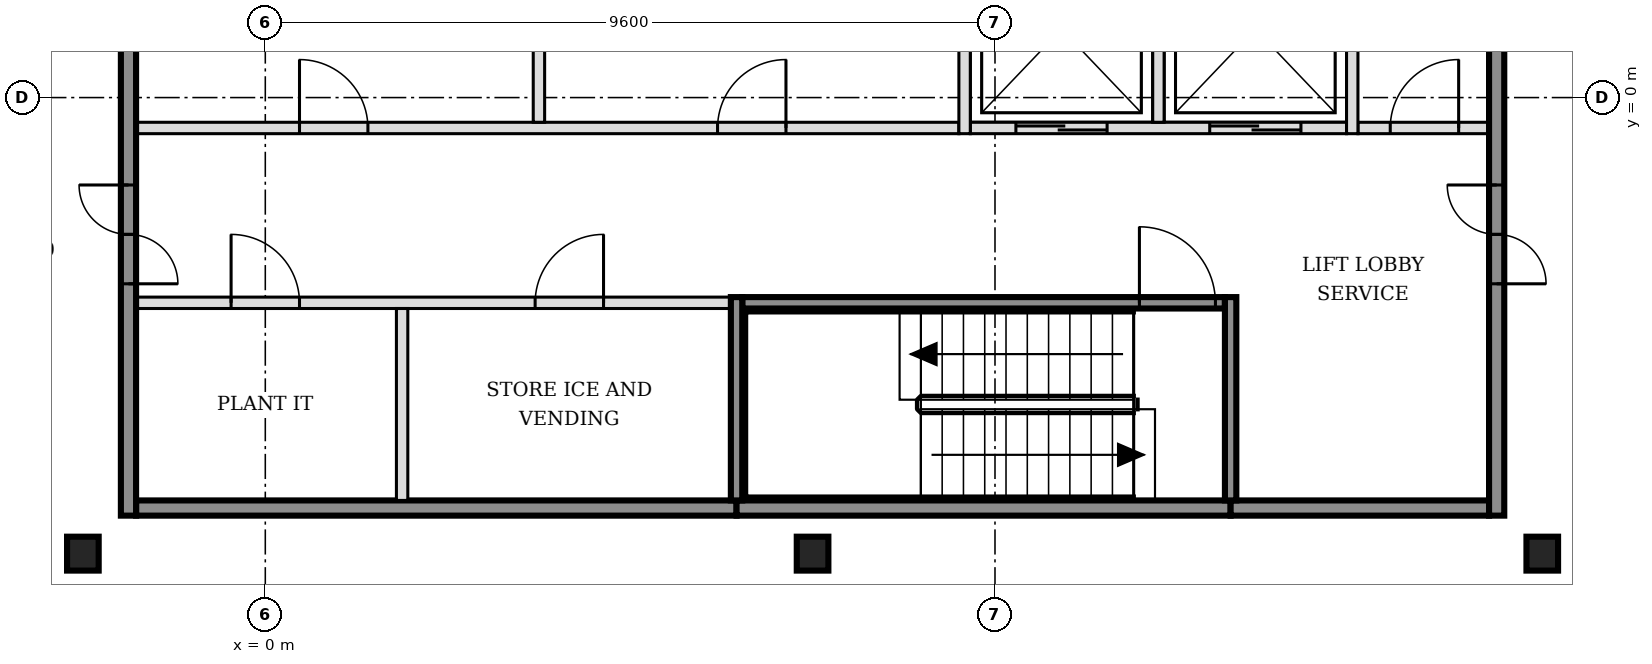
"""IFC4 building model, lengths in metres.
Left out: names, types, materials, properties, quantities, classifications, styles, units other than length and angle.
Written with IfcOpenShell. Run it as: python <this file> out.ifc"""

import sys

from ifc_helpers import new_model, si_unit, direction, frame, frame_2d, origin, origin_2d, place, context, subcontext, project, spatial, rectangle, i_section, extrude, element, fill, save


model = new_model("IFC4")
c1 = context("Model", 3, precision=1e-05, world=origin(), true_north=direction((0.0, 1.0)))
c2 = subcontext(c1, "Body", "Model", "MODEL_VIEW")
j1 = project(units=[si_unit("LENGTHUNIT", "METRE"), si_unit("PLANEANGLEUNIT", "RADIAN")], contexts=[c1])
p1 = place(None, origin())
s1 = spatial("IfcSite", under=j1, at=p1, CompositionType="ELEMENT")
p2 = place(p1, origin())
s2 = spatial("IfcBuilding", under=s1, at=p2, CompositionType="ELEMENT")
p3 = place(p2, frame((0.0, 0.0, 165.0)))
s3 = spatial("IfcBuildingStorey", under=s2, at=p3, CompositionType="ELEMENT", Elevation=165.0)
for number, where, z_axis, x_axis in (
    (1, (-2.4, -6.0, -0.15), (0.0, 0.0, 1.0), (1.0, 0.0, 0.0)),
    (2, (7.2, -6.0, -0.15), (0.0, 0.0, 1.0), (1.0, 0.0, 0.0)),
    (3, (16.8, -6.0, -0.15), (0.0, 0.0, 1.0), (1.0, 0.0, 0.0)),
):
    element("IfcColumn", number, at=place(p3, frame(where, z_axis=z_axis, x_axis=x_axis)), inside=s3, PredefinedType="COLUMN", context=c2, shape_type="SweptSolid", body=[
        extrude(i_section(OverallWidth=0.416, OverallDepth=0.446, WebThickness=0.039, FlangeThickness=0.063, FilletRadius=0.015, at=origin_2d()), origin(), (0.0, 0.0, 1.0), 3.6),
    ])
p4 = place(p3, frame((-1.7, -5.4, 0.0), z_axis=(0.0, 0.0, 1.0), x_axis=(1.0, 0.0, 0.0)))
e4 = element("IfcWall", 4, at=p4, inside=s3, PredefinedType="SOLIDWALL", context=c2, shape_type="SweptSolid", body=[
    extrude(rectangle(XDim=7.9, YDim=0.2, at=frame_2d((3.95, 0.0))), origin(), (0.0, 0.0, 1.0), 3.45),
])
p5 = place(p3, frame((6.2, -5.4, 0.0), z_axis=(0.0, 0.0, 1.0), x_axis=(1.0, 0.0, 0.0)))
e5 = element("IfcWall", 5, at=p5, inside=s3, PredefinedType="SOLIDWALL", context=c2, shape_type="SweptSolid", body=[
    extrude(rectangle(XDim=6.5, YDim=0.2, at=frame_2d((3.25, 0.0))), origin(), (0.0, 0.0, 1.0), 3.45),
])
p6 = place(p3, frame((12.7, -5.4, 0.0), z_axis=(0.0, 0.0, 1.0), x_axis=(1.0, 0.0, 0.0)))
e6 = element("IfcWall", 6, at=p6, inside=s3, PredefinedType="SOLIDWALL", context=c2, shape_type="SweptSolid", body=[
    extrude(rectangle(XDim=3.4, YDim=0.2, at=frame_2d((1.7, 0.0))), origin(), (0.0, 0.0, 1.0), 3.45),
])
p7 = place(p3, frame((-1.7, -2.7, 0.0), z_axis=(0.0, 0.0, 1.0), x_axis=(1.0, 0.0, 0.0)))
e7 = element("IfcWall", 7, at=p7, inside=s3, PredefinedType="PARTITIONING", context=c2, shape_type="SweptSolid", body=[
    extrude(rectangle(XDim=7.825, YDim=0.15, at=frame_2d((3.913, 0.0))), origin(), (0.0, 0.0, 1.0), 3.45),
])
p8 = place(p7, frame((1.25, 0.0, 0.0)))
e8 = element("IfcOpeningElement", 8, at=p8, cuts=e7, PredefinedType="OPENING", context=c2, shape_type="SweptSolid", body=[
    extrude(rectangle(XDim=0.9, YDim=2.1, at=frame_2d((0.45, 1.05))), frame((0.0, 0.085, 0.0), z_axis=(0.0, -1.0, 0.0), x_axis=(1.0, 0.0, 0.0)), (0.0, 0.0, 1.0), 0.17),
])
p9 = place(p7, frame((5.25, 0.0, 0.0)))
e9 = element("IfcOpeningElement", 9, at=p9, cuts=e7, PredefinedType="OPENING", context=c2, shape_type="SweptSolid", body=[
    extrude(rectangle(XDim=0.9, YDim=2.1, at=frame_2d((0.45, 1.05))), frame((0.0, 0.085, 0.0), z_axis=(0.0, -1.0, 0.0), x_axis=(1.0, 0.0, 0.0)), (0.0, 0.0, 1.0), 0.17),
])
p10 = place(p3, frame((6.275, -2.7, 0.0), z_axis=(0.0, 0.0, 1.0), x_axis=(1.0, 0.0, 0.0)))
e10 = element("IfcWall", 10, at=p10, inside=s3, PredefinedType="SOLIDWALL", context=c2, shape_type="SweptSolid", body=[
    extrude(rectangle(XDim=6.35, YDim=0.15, at=frame_2d((3.175, 0.0))), origin(), (0.0, 0.0, 1.0), 3.45),
])
p11 = place(p10, frame((5.225, 0.0, 0.0)))
e11 = element("IfcOpeningElement", 11, at=p11, cuts=e10, PredefinedType="OPENING", context=c2, shape_type="SweptSolid", body=[
    extrude(rectangle(XDim=1.0, YDim=2.1, at=frame_2d((0.5, 1.05))), frame((0.0, 0.085, 0.0), z_axis=(0.0, -1.0, 0.0), x_axis=(1.0, 0.0, 0.0)), (0.0, 0.0, 1.0), 0.17),
])
p12 = place(p3, frame((-1.7, -0.4, 0.0), z_axis=(0.0, 0.0, 1.0), x_axis=(1.0, 0.0, 0.0)))
e12 = element("IfcWall", 12, at=p12, inside=s3, PredefinedType="PARTITIONING", context=c2, shape_type="SweptSolid", body=[
    extrude(rectangle(XDim=10.825, YDim=0.15, at=frame_2d((5.413, 0.0))), origin(), (0.0, 0.0, 1.0), 3.45),
])
p13 = place(p12, frame((2.15, 0.0, 0.0)))
e13 = element("IfcOpeningElement", 13, at=p13, cuts=e12, PredefinedType="OPENING", context=c2, shape_type="SweptSolid", body=[
    extrude(rectangle(XDim=0.9, YDim=2.1, at=frame_2d((0.45, 1.05))), frame((0.0, 0.085, 0.0), z_axis=(0.0, -1.0, 0.0), x_axis=(1.0, 0.0, 0.0)), (0.0, 0.0, 1.0), 0.17),
])
p14 = place(p12, frame((7.65, 0.0, 0.0)))
e14 = element("IfcOpeningElement", 14, at=p14, cuts=e12, PredefinedType="OPENING", context=c2, shape_type="SweptSolid", body=[
    extrude(rectangle(XDim=0.9, YDim=2.1, at=frame_2d((0.45, 1.05))), frame((0.0, 0.085, 0.0), z_axis=(0.0, -1.0, 0.0), x_axis=(1.0, 0.0, 0.0)), (0.0, 0.0, 1.0), 0.17),
])
p15 = place(p3, frame((9.275, -0.4, 0.0), z_axis=(0.0, 0.0, 1.0), x_axis=(1.0, 0.0, 0.0)))
e15 = element("IfcWall", 15, at=p15, inside=s3, PredefinedType="SOLIDWALL", context=c2, shape_type="SweptSolid", body=[
    extrude(rectangle(XDim=4.95, YDim=0.15, at=frame_2d((2.475, 0.0))), origin(), (0.0, 0.0, 1.0), 3.45),
])
p16 = place(p15, frame((0.6, 0.0, 0.0)))
e16 = element("IfcOpeningElement", 16, at=p16, cuts=e15, PredefinedType="OPENING", context=c2, shape_type="SweptSolid", body=[
    extrude(rectangle(XDim=1.2, YDim=2.1, at=frame_2d((0.6, 1.05))), frame((0.0, 0.085, 0.0), z_axis=(0.0, -1.0, 0.0), x_axis=(1.0, 0.0, 0.0)), (0.0, 0.0, 1.0), 0.17),
])
p17 = place(p15, frame((3.15, 0.0, 0.0)))
e17 = element("IfcOpeningElement", 17, at=p17, cuts=e15, PredefinedType="OPENING", context=c2, shape_type="SweptSolid", body=[
    extrude(rectangle(XDim=1.2, YDim=2.1, at=frame_2d((0.6, 1.05))), frame((0.0, 0.085, 0.0), z_axis=(0.0, -1.0, 0.0), x_axis=(1.0, 0.0, 0.0)), (0.0, 0.0, 1.0), 0.17),
])
p18 = place(p3, frame((14.375, -0.4, 0.0), z_axis=(0.0, 0.0, 1.0), x_axis=(1.0, 0.0, 0.0)))
e18 = element("IfcWall", 18, at=p18, inside=s3, PredefinedType="PARTITIONING", context=c2, shape_type="SweptSolid", body=[
    extrude(rectangle(XDim=1.725, YDim=0.15, at=frame_2d((0.863, 0.0))), origin(), (0.0, 0.0, 1.0), 3.45),
])
p19 = place(p18, frame((0.425, 0.0, 0.0)))
e19 = element("IfcOpeningElement", 19, at=p19, cuts=e18, PredefinedType="OPENING", context=c2, shape_type="SweptSolid", body=[
    extrude(rectangle(XDim=0.9, YDim=2.1, at=frame_2d((0.45, 1.05))), frame((0.0, 0.085, 0.0), z_axis=(0.0, -1.0, 0.0), x_axis=(1.0, 0.0, 0.0)), (0.0, 0.0, 1.0), 0.17),
])
p20 = place(p3, frame((-1.8, -5.5, 0.0), z_axis=(0.0, 0.0, 1.0), x_axis=(0.0, 1.0, 0.0)))
e20 = element("IfcWall", 20, at=p20, inside=s3, PredefinedType="SOLIDWALL", context=c2, shape_type="SweptSolid", body=[
    extrude(rectangle(XDim=15.8, YDim=0.2, at=frame_2d((7.9, 0.0))), origin(), (0.0, 0.0, 1.0), 3.45),
])
p21 = place(p20, frame((3.05, 0.0, 0.0)))
e21 = element("IfcOpeningElement", 21, at=p21, cuts=e20, PredefinedType="OPENING", context=c2, shape_type="SweptSolid", body=[
    extrude(rectangle(XDim=1.3, YDim=2.1, at=frame_2d((0.65, 1.05))), frame((0.0, 0.11, 0.0), z_axis=(0.0, -1.0, 0.0), x_axis=(1.0, 0.0, 0.0)), (0.0, 0.0, 1.0), 0.22),
])
p22 = place(p20, frame((11.45, 0.0, 0.0)))
e22 = element("IfcOpeningElement", 22, at=p22, cuts=e20, PredefinedType="OPENING", context=c2, shape_type="SweptSolid", body=[
    extrude(rectangle(XDim=1.3, YDim=2.1, at=frame_2d((0.65, 1.05))), frame((0.0, 0.11, 0.0), z_axis=(0.0, -1.0, 0.0), x_axis=(1.0, 0.0, 0.0)), (0.0, 0.0, 1.0), 0.22),
])
p23 = place(p3, frame((1.8, -5.3, 0.0), z_axis=(0.0, 0.0, 1.0), x_axis=(0.0, 1.0, 0.0)))
e23 = element("IfcWall", 23, at=p23, inside=s3, PredefinedType="PARTITIONING", context=c2, shape_type="SweptSolid", body=[
    extrude(rectangle(XDim=2.525, YDim=0.15, at=frame_2d((1.263, 0.0))), origin(), (0.0, 0.0, 1.0), 3.45),
])
p24 = place(p3, frame((3.6, -0.325, 0.0), z_axis=(0.0, 0.0, 1.0), x_axis=(0.0, 1.0, 0.0)))
e24 = element("IfcWall", 24, at=p24, inside=s3, PredefinedType="PARTITIONING", context=c2, shape_type="SweptSolid", body=[
    extrude(rectangle(XDim=2.45, YDim=0.15, at=frame_2d((1.225, 0.0))), origin(), (0.0, 0.0, 1.0), 3.45),
])
p25 = place(p3, frame((6.2, -5.3, 0.0), z_axis=(0.0, 0.0, 1.0), x_axis=(0.0, 1.0, 0.0)))
e25 = element("IfcWall", 25, at=p25, inside=s3, PredefinedType="SOLIDWALL", context=c2, shape_type="SweptSolid", body=[
    extrude(rectangle(XDim=2.675, YDim=0.15, at=frame_2d((1.337, 0.0))), origin(), (0.0, 0.0, 1.0), 3.45),
])
p26 = place(p3, frame((9.2, -0.475, 0.0), z_axis=(0.0, 0.0, 1.0), x_axis=(0.0, 1.0, 0.0)))
e26 = element("IfcWall", 26, at=p26, inside=s3, PredefinedType="SOLIDWALL", context=c2, shape_type="SweptSolid", body=[
    extrude(rectangle(XDim=2.6, YDim=0.15, at=frame_2d((1.3, 0.0))), origin(), (0.0, 0.0, 1.0), 3.45),
])
p27 = place(p3, frame((11.75, -0.325, 0.0), z_axis=(0.0, 0.0, 1.0), x_axis=(0.0, 1.0, 0.0)))
e27 = element("IfcWall", 27, at=p27, inside=s3, PredefinedType="SOLIDWALL", context=c2, shape_type="SweptSolid", body=[
    extrude(rectangle(XDim=2.45, YDim=0.15, at=frame_2d((1.225, 0.0))), origin(), (0.0, 0.0, 1.0), 3.45),
])
p28 = place(p3, frame((12.7, -5.3, 0.0), z_axis=(0.0, 0.0, 1.0), x_axis=(0.0, 1.0, 0.0)))
e28 = element("IfcWall", 28, at=p28, inside=s3, PredefinedType="SOLIDWALL", context=c2, shape_type="SweptSolid", body=[
    extrude(rectangle(XDim=2.675, YDim=0.15, at=frame_2d((1.337, 0.0))), origin(), (0.0, 0.0, 1.0), 3.45),
])
p29 = place(p3, frame((14.3, -0.475, 0.0), z_axis=(0.0, 0.0, 1.0), x_axis=(0.0, 1.0, 0.0)))
e29 = element("IfcWall", 29, at=p29, inside=s3, PredefinedType="SOLIDWALL", context=c2, shape_type="SweptSolid", body=[
    extrude(rectangle(XDim=2.75, YDim=0.15, at=frame_2d((1.375, 0.0))), origin(), (0.0, 0.0, 1.0), 3.45),
])
p30 = place(p3, frame((16.2, -5.5, 0.0), z_axis=(0.0, 0.0, 1.0), x_axis=(0.0, 1.0, 0.0)))
e30 = element("IfcWall", 30, at=p30, inside=s3, PredefinedType="SOLIDWALL", context=c2, shape_type="SweptSolid", body=[
    extrude(rectangle(XDim=15.8, YDim=0.2, at=frame_2d((7.9, 0.0))), origin(), (0.0, 0.0, 1.0), 3.45),
])
p31 = place(p30, frame((3.05, 0.0, 0.0)))
e31 = element("IfcOpeningElement", 31, at=p31, cuts=e30, PredefinedType="OPENING", context=c2, shape_type="SweptSolid", body=[
    extrude(rectangle(XDim=1.3, YDim=2.1, at=frame_2d((0.65, 1.05))), frame((0.0, 0.11, 0.0), z_axis=(0.0, -1.0, 0.0), x_axis=(1.0, 0.0, 0.0)), (0.0, 0.0, 1.0), 0.22),
])
p32 = place(p30, frame((11.45, 0.0, 0.0)))
e32 = element("IfcOpeningElement", 32, at=p32, cuts=e30, PredefinedType="OPENING", context=c2, shape_type="SweptSolid", body=[
    extrude(rectangle(XDim=1.3, YDim=2.1, at=frame_2d((0.65, 1.05))), frame((0.0, 0.11, 0.0), z_axis=(0.0, -1.0, 0.0), x_axis=(1.0, 0.0, 0.0)), (0.0, 0.0, 1.0), 0.22),
])
p33 = place(p16, origin())
e33 = element("IfcDoor", 33, at=p33, inside=s3, OperationType="DOUBLE_DOOR_SLIDING", PredefinedType="DOOR", context=c2, shape_type="SweptSolid", body=[
    extrude(rectangle(XDim=1.2, YDim=2.1, at=frame_2d((0.6, 1.05))), frame((0.0, 0.025, 0.0), z_axis=(0.0, -1.0, 0.0), x_axis=(1.0, 0.0, 0.0)), (0.0, 0.0, 1.0), 0.05),
])
fill(e16, e33)
p34 = place(p17, origin())
e34 = element("IfcDoor", 34, at=p34, inside=s3, OperationType="DOUBLE_DOOR_SLIDING", PredefinedType="DOOR", context=c2, shape_type="SweptSolid", body=[
    extrude(rectangle(XDim=1.2, YDim=2.1, at=frame_2d((0.6, 1.05))), frame((0.0, 0.025, 0.0), z_axis=(0.0, -1.0, 0.0), x_axis=(1.0, 0.0, 0.0)), (0.0, 0.0, 1.0), 0.05),
])
fill(e17, e34)
p35 = place(p11, origin())
e35 = element("IfcDoor", 35, at=p35, inside=s3, OperationType="SINGLE_SWING_LEFT", PredefinedType="DOOR", context=c2, shape_type="SweptSolid", body=[
    extrude(rectangle(XDim=1.0, YDim=2.1, at=frame_2d((0.5, 1.05))), frame((0.0, 0.025, 0.0), z_axis=(0.0, -1.0, 0.0), x_axis=(1.0, 0.0, 0.0)), (0.0, 0.0, 1.0), 0.05),
])
fill(e11, e35)
p36 = place(p21, origin())
e36 = element("IfcDoor", 36, at=p36, inside=s3, OperationType="DOUBLE_DOOR_SINGLE_SWING", PredefinedType="DOOR", context=c2, shape_type="SweptSolid", body=[
    extrude(rectangle(XDim=1.3, YDim=2.1, at=frame_2d((0.65, 1.05))), frame((0.0, 0.025, 0.0), z_axis=(0.0, -1.0, 0.0), x_axis=(1.0, 0.0, 0.0)), (0.0, 0.0, 1.0), 0.05),
])
fill(e21, e36)
p37 = place(p31, origin())
e37 = element("IfcDoor", 37, at=p37, inside=s3, OperationType="DOUBLE_DOOR_SINGLE_SWING", PredefinedType="DOOR", context=c2, shape_type="SweptSolid", body=[
    extrude(rectangle(XDim=1.3, YDim=2.1, at=frame_2d((0.65, 1.05))), frame((0.0, 0.025, 0.0), z_axis=(0.0, -1.0, 0.0), x_axis=(1.0, 0.0, 0.0)), (0.0, 0.0, 1.0), 0.05),
])
fill(e31, e37)
p38 = place(p19, origin())
e38 = element("IfcDoor", 38, at=p38, inside=s3, OperationType="SINGLE_SWING_RIGHT", PredefinedType="DOOR", context=c2, shape_type="SweptSolid", body=[
    extrude(rectangle(XDim=0.9, YDim=2.1, at=frame_2d((0.45, 1.05))), frame((0.0, 0.025, 0.0), z_axis=(0.0, -1.0, 0.0), x_axis=(1.0, 0.0, 0.0)), (0.0, 0.0, 1.0), 0.05),
])
fill(e19, e38)
p39 = place(p8, origin())
e39 = element("IfcDoor", 39, at=p39, inside=s3, OperationType="SINGLE_SWING_LEFT", PredefinedType="DOOR", context=c2, shape_type="SweptSolid", body=[
    extrude(rectangle(XDim=0.9, YDim=2.1, at=frame_2d((0.45, 1.05))), frame((0.0, 0.025, 0.0), z_axis=(0.0, -1.0, 0.0), x_axis=(1.0, 0.0, 0.0)), (0.0, 0.0, 1.0), 0.05),
])
fill(e8, e39)
p40 = place(p9, origin())
e40 = element("IfcDoor", 40, at=p40, inside=s3, OperationType="SINGLE_SWING_RIGHT", PredefinedType="DOOR", context=c2, shape_type="SweptSolid", body=[
    extrude(rectangle(XDim=0.9, YDim=2.1, at=frame_2d((0.45, 1.05))), frame((0.0, 0.025, 0.0), z_axis=(0.0, -1.0, 0.0), x_axis=(1.0, 0.0, 0.0)), (0.0, 0.0, 1.0), 0.05),
])
fill(e9, e40)
p41 = place(p13, origin())
e41 = element("IfcDoor", 41, at=p41, inside=s3, OperationType="SINGLE_SWING_LEFT", PredefinedType="DOOR", context=c2, shape_type="SweptSolid", body=[
    extrude(rectangle(XDim=0.9, YDim=2.1, at=frame_2d((0.45, 1.05))), frame((0.0, 0.025, 0.0), z_axis=(0.0, -1.0, 0.0), x_axis=(1.0, 0.0, 0.0)), (0.0, 0.0, 1.0), 0.05),
])
fill(e13, e41)
p42 = place(p14, origin())
e42 = element("IfcDoor", 42, at=p42, inside=s3, OperationType="SINGLE_SWING_RIGHT", PredefinedType="DOOR", context=c2, shape_type="SweptSolid", body=[
    extrude(rectangle(XDim=0.9, YDim=2.1, at=frame_2d((0.45, 1.05))), frame((0.0, 0.025, 0.0), z_axis=(0.0, -1.0, 0.0), x_axis=(1.0, 0.0, 0.0)), (0.0, 0.0, 1.0), 0.05),
])
fill(e14, e42)
save(model, sys.argv[1])
